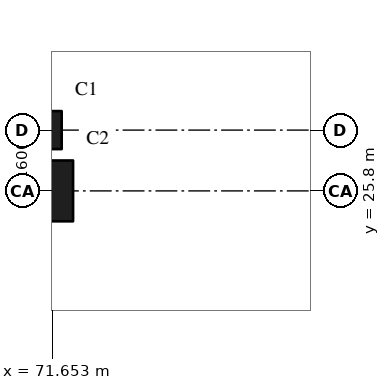
"""IFC4 building model, lengths in metres.
Left out: names, types, materials, properties, quantities, classifications, styles, units other than length and angle.
Written with IfcOpenShell. Run it as: python <this file> out.ifc"""

import sys

from ifc_helpers import new_model, si_unit, direction, frame, origin, origin_2d, place, context, subcontext, project, spatial, rectangle, extrude, element, save


model = new_model("IFC4")
c1 = context("Model", 3, precision=1e-05, world=origin(), true_north=direction((0.0, 1.0)))
c2 = subcontext(c1, "Body", "Model", "MODEL_VIEW")
j1 = project(units=[si_unit("LENGTHUNIT", "METRE"), si_unit("PLANEANGLEUNIT", "RADIAN")], contexts=[c1])
p1 = place(None, origin())
s1 = spatial("IfcSite", under=j1, at=p1, CompositionType="ELEMENT")
p2 = place(p1, origin())
s2 = spatial("IfcBuilding", under=s1, at=p2, CompositionType="ELEMENT")
p3 = place(p2, frame((0.0, 0.0, -12.0)))
s3 = spatial("IfcBuildingStorey", under=s2, at=p3, CompositionType="ELEMENT", Elevation=-12.0)
p4 = place(p3, frame((71.4, 25.8, 0.0), z_axis=(0.0, 0.0, 1.0), x_axis=(1.0, 0.0, 0.0)))
e1 = element("IfcColumn", 1, at=p4, inside=s3, PredefinedType="COLUMN", context=c2, shape_type="SweptSolid", body=[
    extrude(rectangle(XDim=1.6, YDim=1.6, at=origin_2d()), origin(), (0.0, 0.0, 1.0), 5.0),
])
p5 = place(p3, frame((71.4, 27.4, 0.0), z_axis=(0.0, 0.0, 1.0), x_axis=(1.0, 0.0, 0.0)))
e2 = element("IfcColumn", 2, at=p5, inside=s3, PredefinedType="COLUMN", context=c2, shape_type="SweptSolid", body=[
    extrude(rectangle(XDim=1.0, YDim=1.0, at=origin_2d()), origin(), (0.0, 0.0, 1.0), 5.0),
])
save(model, sys.argv[1])
